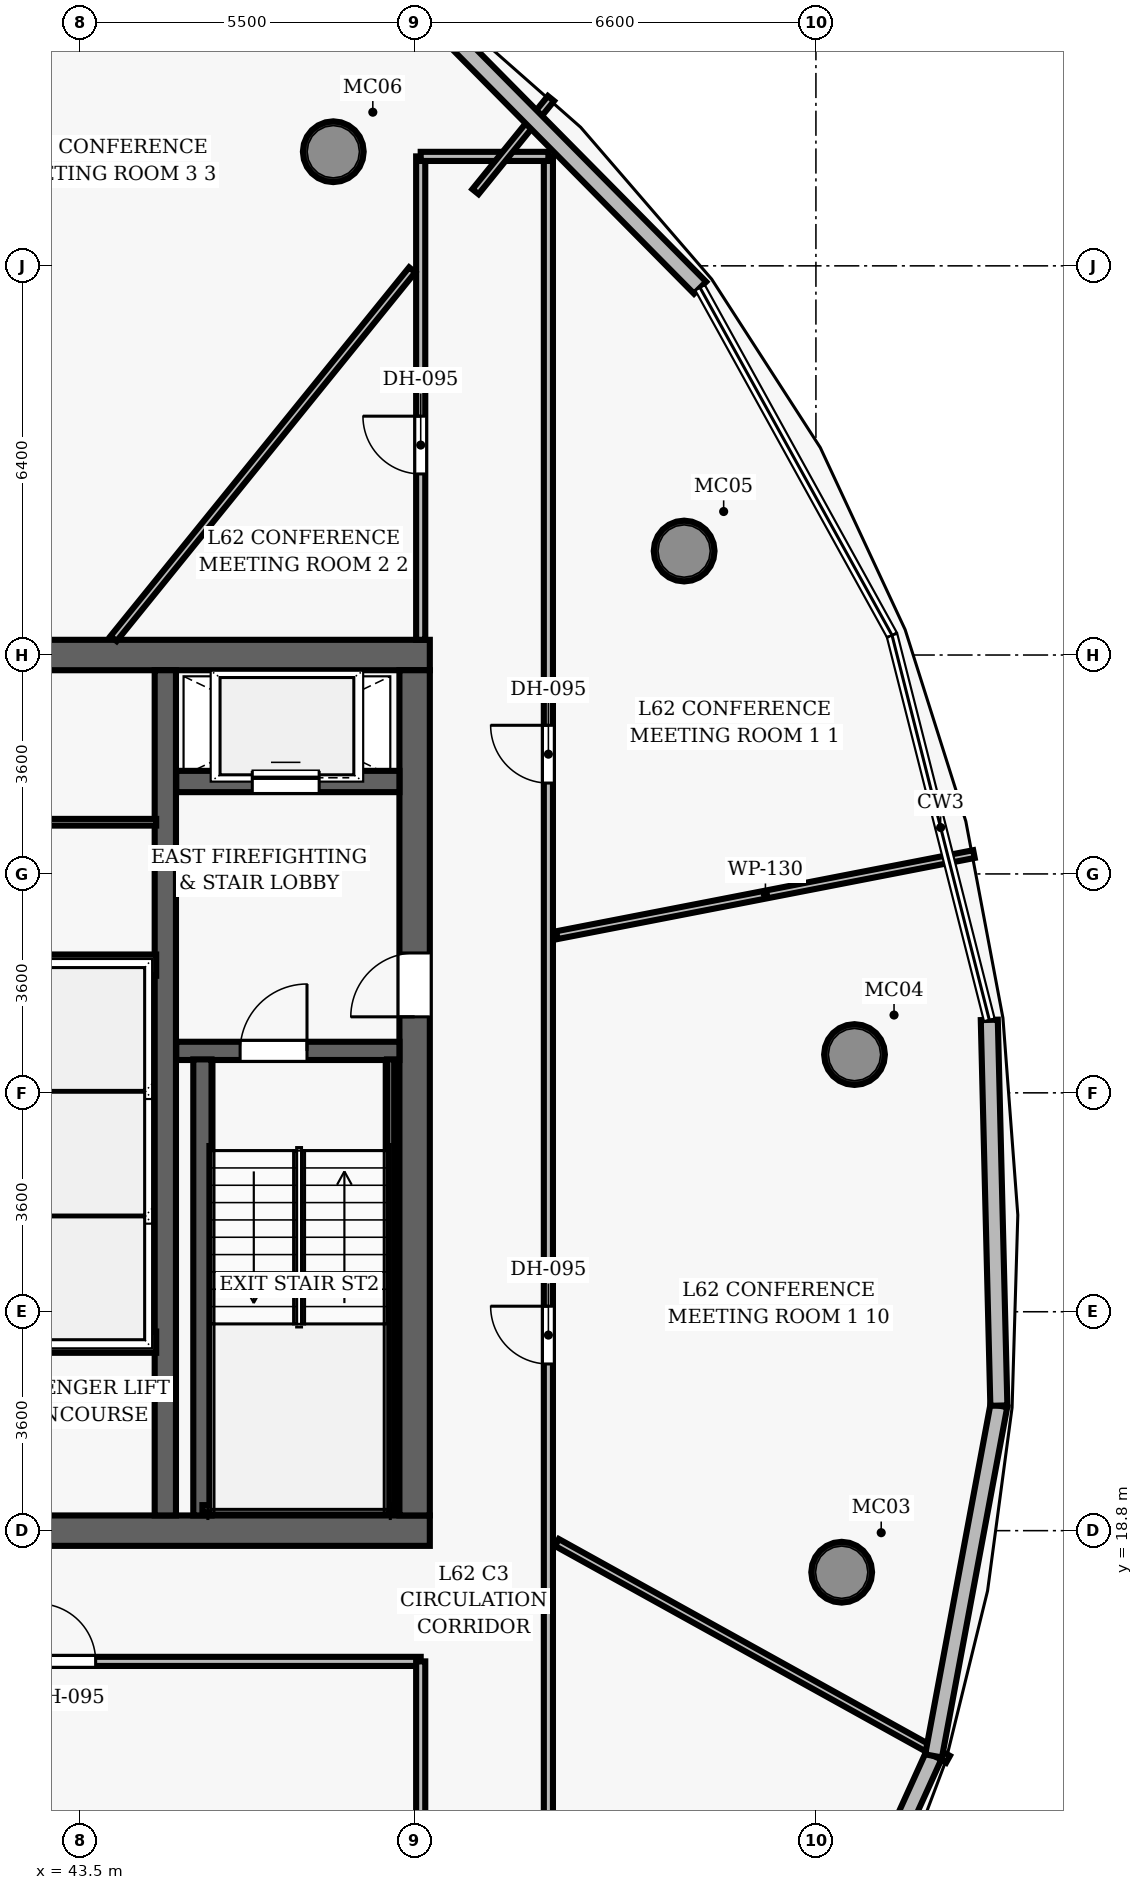
"""IFC4 building model, lengths in metres.
Left out: names, types, materials, properties, quantities, classifications, styles, units other than length and angle.
Written with IfcOpenShell. Run it as: python <this file> out.ifc"""

import sys

from ifc_helpers import new_model, si_unit, direction, frame, frame_2d, origin, origin_2d, place, context, subcontext, project, spatial, rectangle, hollow_circle, extrude, element, fill, save


model = new_model("IFC4")
c1 = context("Model", 3, precision=1e-05, world=origin(), true_north=direction((0.0, 1.0)))
c2 = subcontext(c1, "Body", "Model", "MODEL_VIEW")
j1 = project(units=[si_unit("LENGTHUNIT", "METRE"), si_unit("PLANEANGLEUNIT", "RADIAN")], contexts=[c1])
p1 = place(None, origin())
s1 = spatial("IfcSite", under=j1, at=p1, CompositionType="ELEMENT")
p2 = place(p1, origin())
s2 = spatial("IfcBuilding", under=s1, at=p2, CompositionType="ELEMENT")
p3 = place(p2, frame((0.0, 0.0, 245.9)))
s3 = spatial("IfcBuildingStorey", under=s2, at=p3, CompositionType="ELEMENT", Elevation=245.9)
p4 = place(p3, frame((26.75, 18.8, 0.0), z_axis=(0.0, 0.0, 1.0), x_axis=(1.0, 0.0, 0.0)))
e1 = element("IfcWall", 1, at=p4, inside=s3, PredefinedType="SHEAR", context=c2, shape_type="SweptSolid", body=[
    extrude(rectangle(XDim=22.5, YDim=0.5, at=frame_2d((11.25, 0.0))), origin(), (0.0, 0.0, 1.0), 3.85),
])
p5 = place(p4, frame((14.47, 0.0, 0.0)))
e2 = element("IfcOpeningElement", 2, at=p5, cuts=e1, PredefinedType="OPENING", context=c2, shape_type="SweptSolid", body=[
    extrude(rectangle(XDim=1.05, YDim=2.15, at=frame_2d((0.525, 1.075))), frame((0.0, 0.26, 0.0), z_axis=(0.0, -1.0, 0.0), x_axis=(1.0, 0.0, 0.0)), (0.0, 0.0, 1.0), 0.52),
])
p6 = place(p3, frame((26.75, 33.2, 0.0), z_axis=(0.0, 0.0, 1.0), x_axis=(1.0, 0.0, 0.0)))
e3 = element("IfcWall", 3, at=p6, inside=s3, PredefinedType="SHEAR", context=c2, shape_type="SweptSolid", body=[
    extrude(rectangle(XDim=22.5, YDim=0.5, at=frame_2d((11.25, 0.0))), origin(), (0.0, 0.0, 1.0), 3.85),
])
p7 = place(p3, frame((49.0, 19.05, 0.0), z_axis=(0.0, 0.0, 1.0), x_axis=(0.0, 1.0, 0.0)))
e4 = element("IfcWall", 4, at=p7, inside=s3, PredefinedType="SHEAR", context=c2, shape_type="SweptSolid", body=[
    extrude(rectangle(XDim=13.9, YDim=0.5, at=frame_2d((6.95, 0.0))), origin(), (0.0, 0.0, 1.0), 3.85),
])
p8 = place(p7, frame((8.2, 0.0, 0.0)))
e5 = element("IfcOpeningElement", 5, at=p8, cuts=e4, PredefinedType="OPENING", context=c2, shape_type="SweptSolid", body=[
    extrude(rectangle(XDim=1.05, YDim=2.15, at=frame_2d((0.525, 1.075))), frame((0.0, 0.26, 0.0), z_axis=(0.0, -1.0, 0.0), x_axis=(1.0, 0.0, 0.0)), (0.0, 0.0, 1.0), 0.52),
])
p9 = place(p3, frame((44.9, 19.05, 0.0), z_axis=(0.0, 0.0, 1.0), x_axis=(0.0, 1.0, 0.0)))
e6 = element("IfcWall", 6, at=p9, inside=s3, PredefinedType="SHEAR", context=c2, shape_type="SweptSolid", body=[
    extrude(rectangle(XDim=13.9, YDim=0.35, at=frame_2d((6.95, 0.0))), origin(), (0.0, 0.0, 1.0), 3.85),
])
for number, where, z_axis, x_axis in (
    (7, (56.024, 18.116, 0.0), (0.0, 0.0, 1.0), (1.0, 0.0, 0.0)),
    (8, (56.235, 26.629, 0.0), (0.0, 0.0, 1.0), (1.0, 0.0, 0.0)),
    (9, (53.433, 34.91, 0.0), (0.0, 0.0, 1.0), (1.0, 0.0, 0.0)),
    (10, (47.662, 41.477, 0.0), (0.0, 0.0, 1.0), (1.0, 0.0, 0.0)),
):
    element("IfcColumn", number, at=place(p3, frame(where, z_axis=z_axis, x_axis=x_axis)), inside=s3, PredefinedType="COLUMN", context=c2, shape_type="SweptSolid", body=[
        extrude(hollow_circle(Radius=0.5, WallThickness=0.045, at=origin_2d()), origin(), (0.0, 0.0, 1.0), 3.85),
    ])
p10 = place(p3, frame((45.08, 26.69, 0.0), z_axis=(0.0, 0.0, 1.0), x_axis=(1.0, 0.0, 0.0)))
e11 = element("IfcWall", 11, at=p10, inside=s3, PredefinedType="SHEAR", context=c2, shape_type="SweptSolid", body=[
    extrude(rectangle(XDim=3.67, YDim=0.3, at=frame_2d((1.835, 0.0))), origin(), (0.0, 0.0, 1.0), 3.85),
])
p11 = place(p10, frame((1.05, 0.0, 0.0)))
e12 = element("IfcOpeningElement", 12, at=p11, cuts=e11, PredefinedType="OPENING", context=c2, shape_type="SweptSolid", body=[
    extrude(rectangle(XDim=1.1, YDim=2.15, at=frame_2d((0.55, 1.075))), frame((0.0, 0.16, 0.0), z_axis=(0.0, -1.0, 0.0), x_axis=(1.0, 0.0, 0.0)), (0.0, 0.0, 1.0), 0.32),
])
p12 = place(p3, frame((45.51, 19.05, 0.0), z_axis=(0.0, 0.0, 1.0), x_axis=(0.0, 1.0, 0.0)))
e13 = element("IfcWall", 13, at=p12, inside=s3, PredefinedType="SHEAR", context=c2, shape_type="SweptSolid", body=[
    extrude(rectangle(XDim=7.5, YDim=0.3, at=frame_2d((3.75, 0.0))), origin(), (0.0, 0.0, 1.0), 3.85),
])
p13 = place(p3, frame((48.605, 19.1, 0.0), z_axis=(0.0, 0.0, 1.0), x_axis=(0.0, 1.0, 0.0)))
e14 = element("IfcWall", 14, at=p13, inside=s3, PredefinedType="SHEAR", context=c2, shape_type="SweptSolid", body=[
    extrude(rectangle(XDim=7.45, YDim=0.12, at=frame_2d((3.725, 0.0))), origin(), (0.0, 0.0, 1.0), 3.85),
])
p14 = place(p3, frame((45.51, 19.16, 0.0), z_axis=(0.0, 0.0, 1.0), x_axis=(1.0, 0.0, 0.0)))
e15 = element("IfcWall", 15, at=p14, inside=s3, PredefinedType="SHEAR", context=c2, shape_type="SweptSolid", body=[
    extrude(rectangle(XDim=3.095, YDim=0.12, at=frame_2d((1.547, 0.0))), origin(), (0.0, 0.0, 1.0), 3.85),
])
p15 = place(p3, frame((45.08, 31.12, 0.0), z_axis=(0.0, 0.0, 1.0), x_axis=(1.0, 0.0, 0.0)))
e16 = element("IfcWall", 16, at=p15, inside=s3, PredefinedType="SHEAR", context=c2, shape_type="SweptSolid", body=[
    extrude(rectangle(XDim=3.67, YDim=0.35, at=frame_2d((1.835, 0.0))), origin(), (0.0, 0.0, 1.0), 3.04),
])
p16 = place(p15, frame((1.25, 0.0, 0.0)))
e17 = element("IfcOpeningElement", 17, at=p16, cuts=e16, PredefinedType="OPENING", context=c2, shape_type="SweptSolid", body=[
    extrude(rectangle(XDim=1.1, YDim=2.15, at=frame_2d((0.55, 1.075))), frame((0.0, 0.185, 0.0), z_axis=(0.0, -1.0, 0.0), x_axis=(1.0, 0.0, 0.0)), (0.0, 0.0, 1.0), 0.37),
])
for number, where, z_axis, x_axis in (
    (18, (42.72, 21.9, 0.0), (0.0, 0.0, 1.0), (1.0, 0.0, 0.0)),
    (19, (42.72, 28.1, 0.0), (0.0, 0.0, 1.0), (1.0, 0.0, 0.0)),
):
    element("IfcWall", number, at=place(p3, frame(where, z_axis=z_axis, x_axis=x_axis)), inside=s3, PredefinedType="SHEAR", context=c2, shape_type="SweptSolid", body=[
        extrude(rectangle(XDim=2.03, YDim=0.35, at=frame_2d((1.015, 0.0))), origin(), (0.0, 0.0, 1.0), 3.04),
    ])
p17 = place(p3, frame((42.55, 30.45, 0.0), z_axis=(0.0, 0.0, 1.0), x_axis=(1.0, 0.0, 0.0)))
e20 = element("IfcWall", 20, at=p17, inside=s3, PredefinedType="PARTITIONING", context=c2, shape_type="SweptSolid", body=[
    extrude(rectangle(XDim=2.2, YDim=0.11, at=frame_2d((1.1, 0.0))), origin(), (0.0, 0.0, 1.0), 3.04),
])
p18 = place(p3, frame((26.9, 16.65, 0.0), z_axis=(0.0, 0.0, 1.0), x_axis=(1.0, 0.0, 0.0)))
e21 = element("IfcWall", 21, at=p18, inside=s3, PredefinedType="PARTITIONING", context=c2, shape_type="SweptSolid", body=[
    extrude(rectangle(XDim=22.2, YDim=0.15, at=frame_2d((11.1, 0.0))), origin(), (0.0, 0.0, 1.0), 3.04),
])
p19 = place(p18, frame((5.627, 0.0, 0.0)))
e22 = element("IfcOpeningElement", 22, at=p19, cuts=e21, PredefinedType="OPENING", context=c2, shape_type="SweptSolid", body=[
    extrude(rectangle(XDim=0.95, YDim=2.15, at=frame_2d((0.475, 1.075))), frame((0.0, 0.085, 0.0), z_axis=(0.0, -1.0, 0.0), x_axis=(1.0, 0.0, 0.0)), (0.0, 0.0, 1.0), 0.17),
])
p20 = place(p18, frame((12.684, 0.0, 0.0)))
e23 = element("IfcOpeningElement", 23, at=p20, cuts=e21, PredefinedType="OPENING", context=c2, shape_type="SweptSolid", body=[
    extrude(rectangle(XDim=0.95, YDim=2.15, at=frame_2d((0.475, 1.075))), frame((0.0, 0.085, 0.0), z_axis=(0.0, -1.0, 0.0), x_axis=(1.0, 0.0, 0.0)), (0.0, 0.0, 1.0), 0.17),
])
p21 = place(p18, frame((15.904, 0.0, 0.0)))
e24 = element("IfcOpeningElement", 24, at=p21, cuts=e21, PredefinedType="OPENING", context=c2, shape_type="SweptSolid", body=[
    extrude(rectangle(XDim=0.95, YDim=2.15, at=frame_2d((0.475, 1.075))), frame((0.0, 0.085, 0.0), z_axis=(0.0, -1.0, 0.0), x_axis=(1.0, 0.0, 0.0)), (0.0, 0.0, 1.0), 0.17),
])
p22 = place(p3, frame((51.2, 10.6, 0.0), z_axis=(0.0, 0.0, 1.0), x_axis=(0.0, 1.0, 0.0)))
e25 = element("IfcWall", 25, at=p22, inside=s3, PredefinedType="PARTITIONING", context=c2, shape_type="SweptSolid", body=[
    extrude(rectangle(XDim=30.8, YDim=0.15, at=frame_2d((15.4, 0.0))), origin(), (0.0, 0.0, 1.0), 3.04),
])
p23 = place(p22, frame((20.494, 0.0, 0.0)))
e26 = element("IfcOpeningElement", 26, at=p23, cuts=e25, PredefinedType="OPENING", context=c2, shape_type="SweptSolid", body=[
    extrude(rectangle(XDim=0.95, YDim=2.15, at=frame_2d((0.475, 1.075))), frame((0.0, 0.085, 0.0), z_axis=(0.0, -1.0, 0.0), x_axis=(1.0, 0.0, 0.0)), (0.0, 0.0, 1.0), 0.17),
])
p24 = place(p22, frame((10.941, 0.0, 0.0)))
e27 = element("IfcOpeningElement", 27, at=p24, cuts=e25, PredefinedType="OPENING", context=c2, shape_type="SweptSolid", body=[
    extrude(rectangle(XDim=0.95, YDim=2.15, at=frame_2d((0.475, 1.075))), frame((0.0, 0.085, 0.0), z_axis=(0.0, -1.0, 0.0), x_axis=(1.0, 0.0, 0.0)), (0.0, 0.0, 1.0), 0.17),
])
p25 = place(p3, frame((49.1, 10.6, 0.0), z_axis=(0.0, 0.0, 1.0), x_axis=(0.0, 1.0, 0.0)))
e28 = element("IfcWall", 28, at=p25, inside=s3, PredefinedType="PARTITIONING", context=c2, shape_type="SweptSolid", body=[
    extrude(rectangle(XDim=6.05, YDim=0.15, at=frame_2d((3.025, 0.0))), origin(), (0.0, 0.0, 1.0), 3.04),
])
p26 = place(p3, frame((49.1, 33.45, 0.0), z_axis=(0.0, 0.0, 1.0), x_axis=(0.0, 1.0, 0.0)))
e29 = element("IfcWall", 29, at=p26, inside=s3, PredefinedType="PARTITIONING", context=c2, shape_type="SweptSolid", body=[
    extrude(rectangle(XDim=7.95, YDim=0.15, at=frame_2d((3.975, 0.0))), origin(), (0.0, 0.0, 1.0), 3.04),
])
p27 = place(p26, frame((2.728, 0.0, 0.0)))
e30 = element("IfcOpeningElement", 30, at=p27, cuts=e29, PredefinedType="OPENING", context=c2, shape_type="SweptSolid", body=[
    extrude(rectangle(XDim=0.95, YDim=2.15, at=frame_2d((0.475, 1.075))), frame((0.0, 0.085, 0.0), z_axis=(0.0, -1.0, 0.0), x_axis=(1.0, 0.0, 0.0)), (0.0, 0.0, 1.0), 0.17),
])
p28 = place(p3, frame((49.1, 41.4, 0.0), z_axis=(0.0, 0.0, 1.0), x_axis=(1.0, 0.0, 0.0)))
e31 = element("IfcWall", 31, at=p28, inside=s3, PredefinedType="PARTITIONING", context=c2, shape_type="SweptSolid", body=[
    extrude(rectangle(XDim=2.1, YDim=0.15, at=frame_2d((1.05, 0.0))), origin(), (0.0, 0.0, 1.0), 3.04),
])
p29 = place(p3, frame((51.34, 28.593, 0.0), z_axis=(0.0, 0.0, 1.0), x_axis=(0.981625390304, 0.190818220071, 0.0)))
e32 = element("IfcWall", 32, at=p29, inside=s3, PredefinedType="PARTITIONING", context=c2, shape_type="SweptSolid", body=[
    extrude(rectangle(XDim=6.987, YDim=0.13, at=frame_2d((3.494, 0.0))), origin(), (0.0, 0.0, 1.0), 3.04),
])
p30 = place(p3, frame((44.049, 33.47, 0.0), z_axis=(0.0, 0.0, 1.0), x_axis=(0.629319722443, 0.777146502883, 0.0)))
e33 = element("IfcWall", 33, at=p30, inside=s3, PredefinedType="PARTITIONING", context=c2, shape_type="SweptSolid", body=[
    extrude(rectangle(XDim=7.803, YDim=0.13, at=frame_2d((3.902, 0.0))), origin(), (0.0, 0.0, 1.0), 3.04),
])
p31 = place(p3, frame((50.001, 40.82, 0.0), z_axis=(0.0, 0.0, 1.0), x_axis=(0.629258768447, 0.777195858412, 0.0)))
e34 = element("IfcWall", 34, at=p31, inside=s3, PredefinedType="PARTITIONING", context=c2, shape_type="SweptSolid", body=[
    extrude(rectangle(XDim=1.972, YDim=0.13, at=frame_2d((0.986, 0.0))), origin(), (0.0, 0.0, 1.0), 3.04),
])
p32 = place(p3, frame((41.643, 16.51, 0.0), z_axis=(0.0, 0.0, 1.0), x_axis=(0.35837217609, -0.933578804068, 0.0)))
e35 = element("IfcWall", 35, at=p32, inside=s3, PredefinedType="PARTITIONING", context=c2, shape_type="SweptSolid", body=[
    extrude(rectangle(XDim=13.103, YDim=0.13, at=frame_2d((6.551, 0.0))), origin(), (0.0, 0.0, 1.0), 3.04),
])
p33 = place(p3, frame((51.34, 18.605, 0.0), z_axis=(0.0, 0.0, 1.0), x_axis=(0.874631338036, -0.48478863696, 0.0)))
e36 = element("IfcWall", 36, at=p33, inside=s3, PredefinedType="PARTITIONING", context=c2, shape_type="SweptSolid", body=[
    extrude(rectangle(XDim=7.354, YDim=0.13, at=frame_2d((3.677, 0.0))), origin(), (0.0, 0.0, 1.0), 3.04),
])
p34 = place(p3, frame((57.535, 15.096, 0.0), z_axis=(0.0, 0.0, 1.0), x_axis=(-0.412989460756, -0.910735804339, 0.0)))
e37 = element("IfcWall", 37, at=p34, inside=s3, PredefinedType="SOLIDWALL", context=c2, shape_type="SweptSolid", body=[
    extrude(rectangle(XDim=5.179, YDim=0.28, at=frame_2d((2.59, 0.0))), origin(), (0.0, 0.0, 1.0), 3.625),
])
p35 = place(p3, frame((58.609, 20.857, 0.0), z_axis=(0.0, 0.0, 1.0), x_axis=(-0.183224424641, -0.983071111474, 0.0)))
e38 = element("IfcWall", 38, at=p35, inside=s3, PredefinedType="SOLIDWALL", context=c2, shape_type="SweptSolid", body=[
    extrude(rectangle(XDim=5.86, YDim=0.28, at=frame_2d((2.93, 0.0))), origin(), (0.0, 0.0, 1.0), 3.625),
])
p36 = place(p3, frame((58.451, 27.2, 0.0), z_axis=(0.0, 0.0, 1.0), x_axis=(0.024818187444, -0.999691981348, 0.0)))
e39 = element("IfcWall", 39, at=p36, inside=s3, PredefinedType="SOLIDWALL", context=c2, shape_type="SweptSolid", body=[
    extrude(rectangle(XDim=6.345, YDim=0.28, at=frame_2d((3.172, 0.0))), origin(), (0.0, 0.0, 1.0), 3.625),
])
p37 = place(p3, frame((49.105, 43.881, 0.0), z_axis=(0.0, 0.0, 1.0), x_axis=(0.703149483936, -0.711042054481, 0.0)))
e40 = element("IfcWall", 40, at=p37, inside=s3, PredefinedType="SOLIDWALL", context=c2, shape_type="SweptSolid", body=[
    extrude(rectangle(XDim=6.527, YDim=0.28, at=frame_2d((3.263, 0.0))), origin(), (0.0, 0.0, 1.0), 3.625),
])
p38 = place(p11, origin())
e41 = element("IfcDoor", 41, at=p38, inside=s3, OperationType="SINGLE_SWING_RIGHT", PredefinedType="DOOR", context=c2, shape_type="SweptSolid", body=[
    extrude(rectangle(XDim=1.1, YDim=2.15, at=frame_2d((0.55, 1.075))), frame((0.0, 0.025, 0.0), z_axis=(0.0, -1.0, 0.0), x_axis=(1.0, 0.0, 0.0)), (0.0, 0.0, 1.0), 0.05),
])
fill(e12, e41)
p39 = place(p8, origin())
e42 = element("IfcDoor", 42, at=p39, inside=s3, OperationType="SINGLE_SWING_LEFT", PredefinedType="DOOR", context=c2, shape_type="SweptSolid", body=[
    extrude(rectangle(XDim=1.05, YDim=2.15, at=frame_2d((0.525, 1.075))), frame((0.0, 0.025, 0.0), z_axis=(0.0, -1.0, 0.0), x_axis=(1.0, 0.0, 0.0)), (0.0, 0.0, 1.0), 0.05),
])
fill(e5, e42)
p40 = place(p23, origin())
e43 = element("IfcDoor", 43, at=p40, inside=s3, OperationType="SINGLE_SWING_RIGHT", PredefinedType="DOOR", context=c2, shape_type="SweptSolid", body=[
    extrude(rectangle(XDim=0.95, YDim=2.15, at=frame_2d((0.475, 1.075))), frame((0.0, 0.025, 0.0), z_axis=(0.0, -1.0, 0.0), x_axis=(1.0, 0.0, 0.0)), (0.0, 0.0, 1.0), 0.05),
])
fill(e26, e43)
p41 = place(p27, origin())
e44 = element("IfcDoor", 44, at=p41, inside=s3, OperationType="SINGLE_SWING_RIGHT", PredefinedType="DOOR", context=c2, shape_type="SweptSolid", body=[
    extrude(rectangle(XDim=0.95, YDim=2.15, at=frame_2d((0.475, 1.075))), frame((0.0, 0.025, 0.0), z_axis=(0.0, -1.0, 0.0), x_axis=(1.0, 0.0, 0.0)), (0.0, 0.0, 1.0), 0.05),
])
fill(e30, e44)
p42 = place(p21, origin())
e45 = element("IfcDoor", 45, at=p42, inside=s3, OperationType="SINGLE_SWING_LEFT", PredefinedType="DOOR", context=c2, shape_type="SweptSolid", body=[
    extrude(rectangle(XDim=0.95, YDim=2.15, at=frame_2d((0.475, 1.075))), frame((0.0, 0.025, 0.0), z_axis=(0.0, -1.0, 0.0), x_axis=(1.0, 0.0, 0.0)), (0.0, 0.0, 1.0), 0.05),
])
fill(e24, e45)
p43 = place(p24, origin())
e46 = element("IfcDoor", 46, at=p43, inside=s3, OperationType="SINGLE_SWING_RIGHT", PredefinedType="DOOR", context=c2, shape_type="SweptSolid", body=[
    extrude(rectangle(XDim=0.95, YDim=2.15, at=frame_2d((0.475, 1.075))), frame((0.0, 0.025, 0.0), z_axis=(0.0, -1.0, 0.0), x_axis=(1.0, 0.0, 0.0)), (0.0, 0.0, 1.0), 0.05),
])
fill(e27, e46)
p44 = place(p16, origin())
e47 = element("IfcDoor", 47, at=p44, inside=s3, OperationType="SLIDING_TO_LEFT", PredefinedType="DOOR", context=c2, shape_type="SweptSolid", body=[
    extrude(rectangle(XDim=1.1, YDim=2.15, at=frame_2d((0.55, 1.075))), frame((0.0, 0.025, 0.0), z_axis=(0.0, -1.0, 0.0), x_axis=(1.0, 0.0, 0.0)), (0.0, 0.0, 1.0), 0.05),
])
fill(e17, e47)
save(model, sys.argv[1])
